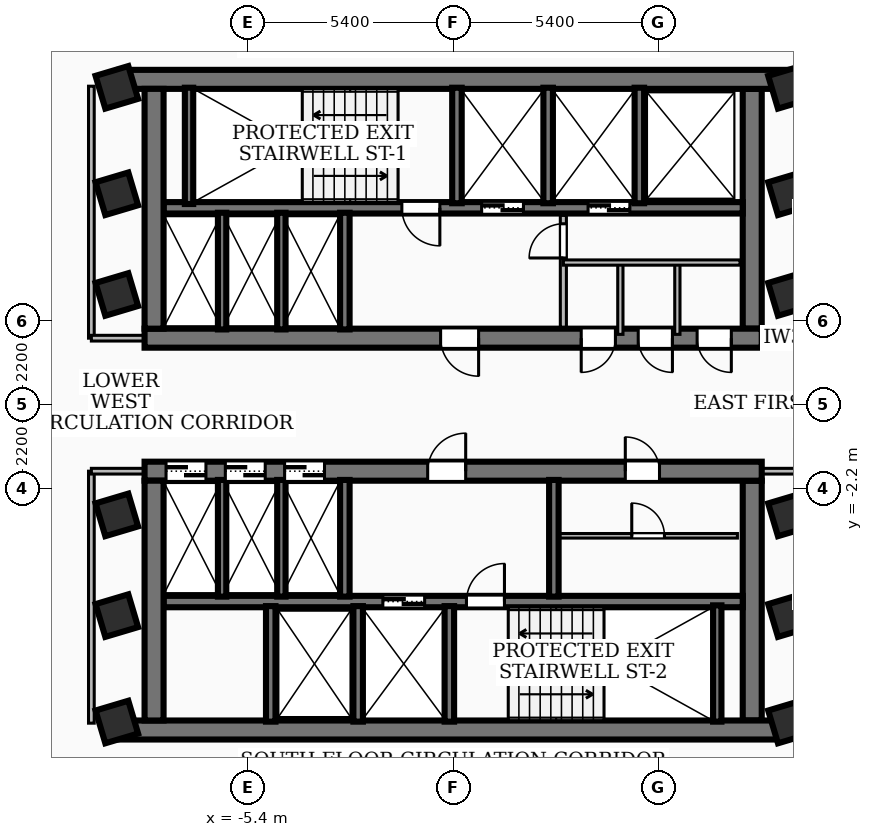
"""IFC4 building model, lengths in metres.
Left out: names, types, materials, properties, quantities, classifications, styles, units other than length and angle.
Written with IfcOpenShell. Run it as: python <this file> out.ifc"""

import sys

from ifc_helpers import new_model, si_unit, direction, frame, frame_2d, origin, origin_2d, place, context, subcontext, project, spatial, rectangle, extrude, element, fill, save


model = new_model("IFC4")
c1 = context("Model", 3, precision=1e-05, world=origin(), true_north=direction((0.0, 1.0)))
c2 = subcontext(c1, "Body", "Model", "MODEL_VIEW")
j1 = project(units=[si_unit("LENGTHUNIT", "METRE"), si_unit("PLANEANGLEUNIT", "RADIAN")], contexts=[c1])
p1 = place(None, origin())
s1 = spatial("IfcSite", under=j1, at=p1, CompositionType="ELEMENT")
p2 = place(p1, origin())
s2 = spatial("IfcBuilding", under=s1, at=p2, CompositionType="ELEMENT")
p3 = place(p2, frame((0.0, 0.0, 145.08)))
s3 = spatial("IfcBuildingStorey", under=s2, at=p3, CompositionType="ELEMENT", Elevation=145.08)
p4 = place(p3, frame((-8.78, 8.56, 0.0), z_axis=(0.0, 0.0, 1.0), x_axis=(1.0, 0.0, 0.0)))
e1 = element("IfcWall", 1, at=p4, inside=s3, PredefinedType="SHEAR", context=c2, shape_type="SweptSolid", body=[
    extrude(rectangle(XDim=17.56, YDim=0.5, at=frame_2d((8.78, 0.0))), origin(), (0.0, 0.0, 1.0), 3.32),
])
p5 = place(p3, frame((8.12, 1.75, 0.0), z_axis=(0.0, 0.0, 1.0), x_axis=(-1.0, 0.0, 0.0)))
e2 = element("IfcWall", 2, at=p5, inside=s3, PredefinedType="SHEAR", context=c2, shape_type="SweptSolid", body=[
    extrude(rectangle(XDim=16.24, YDim=0.5, at=frame_2d((8.12, 0.0))), origin(), (0.0, 0.0, 1.0), 3.32),
])
p6 = place(p5, frame((7.45, 0.0, 0.0)))
e3 = element("IfcOpeningElement", 3, at=p6, cuts=e2, PredefinedType="OPENING", context=c2, shape_type="SweptSolid", body=[
    extrude(rectangle(XDim=1.0, YDim=2.1, at=frame_2d((0.5, 1.05))), frame((0.0, 0.26, 0.0), z_axis=(0.0, -1.0, 0.0), x_axis=(1.0, 0.0, 0.0)), (0.0, 0.0, 1.0), 0.52),
])
p7 = place(p5, frame((3.85, 0.0, 0.0)))
e4 = element("IfcOpeningElement", 4, at=p7, cuts=e2, PredefinedType="OPENING", context=c2, shape_type="SweptSolid", body=[
    extrude(rectangle(XDim=0.9, YDim=2.06, at=frame_2d((0.45, 1.03))), frame((0.0, 0.26, 0.0), z_axis=(0.0, -1.0, 0.0), x_axis=(1.0, 0.0, 0.0)), (0.0, 0.0, 1.0), 0.52),
])
p8 = place(p5, frame((2.35, 0.0, 0.0)))
e5 = element("IfcOpeningElement", 5, at=p8, cuts=e2, PredefinedType="OPENING", context=c2, shape_type="SweptSolid", body=[
    extrude(rectangle(XDim=0.9, YDim=2.06, at=frame_2d((0.45, 1.03))), frame((0.0, 0.26, 0.0), z_axis=(0.0, -1.0, 0.0), x_axis=(1.0, 0.0, 0.0)), (0.0, 0.0, 1.0), 0.52),
])
p9 = place(p5, frame((0.8, 0.0, 0.0)))
e6 = element("IfcOpeningElement", 6, at=p9, cuts=e2, PredefinedType="OPENING", context=c2, shape_type="SweptSolid", body=[
    extrude(rectangle(XDim=0.9, YDim=2.06, at=frame_2d((0.45, 1.03))), frame((0.0, 0.26, 0.0), z_axis=(0.0, -1.0, 0.0), x_axis=(1.0, 0.0, 0.0)), (0.0, 0.0, 1.0), 0.52),
])
for number, where, z_axis, x_axis in (
    (7, (-7.87, 2.0, 0.0), (0.0, 0.0, 1.0), (0.0, 1.0, 0.0)),
    (8, (7.87, 8.31, 0.0), (0.0, 0.0, 1.0), (0.0, -1.0, 0.0)),
):
    element("IfcWall", number, at=place(p3, frame(where, z_axis=z_axis, x_axis=x_axis)), inside=s3, PredefinedType="SHEAR", context=c2, shape_type="SweptSolid", body=[
        extrude(rectangle(XDim=6.31, YDim=0.5, at=frame_2d((3.155, 0.0))), origin(), (0.0, 0.0, 1.0), 3.32),
    ])
p10 = place(p3, frame((7.62, 5.18, 0.0), z_axis=(0.0, 0.0, 1.0), x_axis=(-1.0, 0.0, 0.0)))
e9 = element("IfcWall", 9, at=p10, inside=s3, PredefinedType="SOLIDWALL", context=c2, shape_type="SweptSolid", body=[
    extrude(rectangle(XDim=15.24, YDim=0.3, at=frame_2d((7.62, 0.0))), origin(), (0.0, 0.0, 1.0), 3.32),
])
p11 = place(p10, frame((5.77, 0.0, 0.0)))
e10 = element("IfcOpeningElement", 10, at=p11, cuts=e9, PredefinedType="OPENING", context=c2, shape_type="SweptSolid", body=[
    extrude(rectangle(XDim=1.1, YDim=2.15, at=frame_2d((0.55, 1.075))), frame((0.0, 0.16, 0.0), z_axis=(0.0, -1.0, 0.0), x_axis=(1.0, 0.0, 0.0)), (0.0, 0.0, 1.0), 0.32),
])
p12 = place(p10, frame((2.97, 0.0, 0.0)))
e11 = element("IfcOpeningElement", 11, at=p12, cuts=e9, PredefinedType="OPENING", context=c2, shape_type="SweptSolid", body=[
    extrude(rectangle(XDim=1.1, YDim=2.15, at=frame_2d((0.55, 1.075))), frame((0.0, 0.16, 0.0), z_axis=(0.0, -1.0, 0.0), x_axis=(1.0, 0.0, 0.0)), (0.0, 0.0, 1.0), 0.32),
])
p13 = place(p10, frame((7.97, 0.0, 0.0)))
e12 = element("IfcOpeningElement", 12, at=p13, cuts=e9, PredefinedType="OPENING", context=c2, shape_type="SweptSolid", body=[
    extrude(rectangle(XDim=1.0, YDim=2.1, at=frame_2d((0.5, 1.05))), frame((0.0, 0.16, 0.0), z_axis=(0.0, -1.0, 0.0), x_axis=(1.0, 0.0, 0.0)), (0.0, 0.0, 1.0), 0.32),
])
p14 = place(p3, frame((8.78, -8.56, 0.0), z_axis=(0.0, 0.0, 1.0), x_axis=(-1.0, 0.0, 0.0)))
e13 = element("IfcWall", 13, at=p14, inside=s3, PredefinedType="SHEAR", context=c2, shape_type="SweptSolid", body=[
    extrude(rectangle(XDim=17.56, YDim=0.5, at=frame_2d((8.78, 0.0))), origin(), (0.0, 0.0, 1.0), 3.32),
])
p15 = place(p3, frame((-8.12, -1.75, 0.0), z_axis=(0.0, 0.0, 1.0), x_axis=(1.0, 0.0, 0.0)))
e14 = element("IfcWall", 14, at=p15, inside=s3, PredefinedType="SHEAR", context=c2, shape_type="SweptSolid", body=[
    extrude(rectangle(XDim=16.24, YDim=0.5, at=frame_2d((8.12, 0.0))), origin(), (0.0, 0.0, 1.0), 3.32),
])
p16 = place(p15, frame((7.45, 0.0, 0.0)))
e15 = element("IfcOpeningElement", 15, at=p16, cuts=e14, PredefinedType="OPENING", context=c2, shape_type="SweptSolid", body=[
    extrude(rectangle(XDim=1.0, YDim=2.1, at=frame_2d((0.5, 1.05))), frame((0.0, 0.26, 0.0), z_axis=(0.0, -1.0, 0.0), x_axis=(1.0, 0.0, 0.0)), (0.0, 0.0, 1.0), 0.52),
])
p17 = place(p15, frame((12.65, 0.0, 0.0)))
e16 = element("IfcOpeningElement", 16, at=p17, cuts=e14, PredefinedType="OPENING", context=c2, shape_type="SweptSolid", body=[
    extrude(rectangle(XDim=0.9, YDim=2.06, at=frame_2d((0.45, 1.03))), frame((0.0, 0.26, 0.0), z_axis=(0.0, -1.0, 0.0), x_axis=(1.0, 0.0, 0.0)), (0.0, 0.0, 1.0), 0.52),
])
p18 = place(p15, frame((0.565, 0.0, 0.0)))
e17 = element("IfcOpeningElement", 17, at=p18, cuts=e14, PredefinedType="OPENING", context=c2, shape_type="SweptSolid", body=[
    extrude(rectangle(XDim=1.05, YDim=2.15, at=frame_2d((0.525, 1.075))), frame((0.0, 0.26, 0.0), z_axis=(0.0, -1.0, 0.0), x_axis=(1.0, 0.0, 0.0)), (0.0, 0.0, 1.0), 0.52),
])
p19 = place(p15, frame((2.125, 0.0, 0.0)))
e18 = element("IfcOpeningElement", 18, at=p19, cuts=e14, PredefinedType="OPENING", context=c2, shape_type="SweptSolid", body=[
    extrude(rectangle(XDim=1.05, YDim=2.15, at=frame_2d((0.525, 1.075))), frame((0.0, 0.26, 0.0), z_axis=(0.0, -1.0, 0.0), x_axis=(1.0, 0.0, 0.0)), (0.0, 0.0, 1.0), 0.52),
])
p20 = place(p15, frame((3.685, 0.0, 0.0)))
e19 = element("IfcOpeningElement", 19, at=p20, cuts=e14, PredefinedType="OPENING", context=c2, shape_type="SweptSolid", body=[
    extrude(rectangle(XDim=1.05, YDim=2.15, at=frame_2d((0.525, 1.075))), frame((0.0, 0.26, 0.0), z_axis=(0.0, -1.0, 0.0), x_axis=(1.0, 0.0, 0.0)), (0.0, 0.0, 1.0), 0.52),
])
for number, where, z_axis, x_axis in (
    (20, (-7.87, -8.31, 0.0), (0.0, 0.0, 1.0), (0.0, 1.0, 0.0)),
    (21, (7.87, -2.0, 0.0), (0.0, 0.0, 1.0), (0.0, -1.0, 0.0)),
):
    element("IfcWall", number, at=place(p3, frame(where, z_axis=z_axis, x_axis=x_axis)), inside=s3, PredefinedType="SHEAR", context=c2, shape_type="SweptSolid", body=[
        extrude(rectangle(XDim=6.31, YDim=0.5, at=frame_2d((3.155, 0.0))), origin(), (0.0, 0.0, 1.0), 3.32),
    ])
p21 = place(p3, frame((-7.62, -5.18, 0.0), z_axis=(0.0, 0.0, 1.0), x_axis=(1.0, 0.0, 0.0)))
e22 = element("IfcWall", 22, at=p21, inside=s3, PredefinedType="SOLIDWALL", context=c2, shape_type="SweptSolid", body=[
    extrude(rectangle(XDim=15.24, YDim=0.3, at=frame_2d((7.62, 0.0))), origin(), (0.0, 0.0, 1.0), 3.32),
])
p22 = place(p21, frame((5.77, 0.0, 0.0)))
e23 = element("IfcOpeningElement", 23, at=p22, cuts=e22, PredefinedType="OPENING", context=c2, shape_type="SweptSolid", body=[
    extrude(rectangle(XDim=1.1, YDim=2.15, at=frame_2d((0.55, 1.075))), frame((0.0, 0.16, 0.0), z_axis=(0.0, -1.0, 0.0), x_axis=(1.0, 0.0, 0.0)), (0.0, 0.0, 1.0), 0.32),
])
p23 = place(p21, frame((7.97, 0.0, 0.0)))
e24 = element("IfcOpeningElement", 24, at=p23, cuts=e22, PredefinedType="OPENING", context=c2, shape_type="SweptSolid", body=[
    extrude(rectangle(XDim=1.0, YDim=2.1, at=frame_2d((0.5, 1.05))), frame((0.0, 0.16, 0.0), z_axis=(0.0, -1.0, 0.0), x_axis=(1.0, 0.0, 0.0)), (0.0, 0.0, 1.0), 0.32),
])
for number, where, z_axis, x_axis in (
    (25, (-6.95, 5.28, 0.0), (0.0, 0.0, 1.0), (0.0, 1.0, 0.0)),
    (26, (6.95, -8.34, 0.0), (0.0, 0.0, 1.0), (0.0, 1.0, 0.0)),
):
    element("IfcWall", number, at=place(p3, frame(where, z_axis=z_axis, x_axis=x_axis)), inside=s3, PredefinedType="SOLIDWALL", context=c2, shape_type="SweptSolid", body=[
        extrude(rectangle(XDim=3.06, YDim=0.22, at=frame_2d((1.53, 0.0))), origin(), (0.0, 0.0, 1.0), 3.32),
    ])
for number, where, z_axis, x_axis in (
    (27, (0.1, 5.3, 0.0), (0.0, 0.0, 1.0), (0.0, 1.0, 0.0)),
    (28, (2.5, 5.3, 0.0), (0.0, 0.0, 1.0), (0.0, 1.0, 0.0)),
    (29, (4.9, 5.3, 0.0), (0.0, 0.0, 1.0), (0.0, 1.0, 0.0)),
):
    element("IfcWall", number, at=place(p3, frame(where, z_axis=z_axis, x_axis=x_axis)), inside=s3, PredefinedType="SOLIDWALL", context=c2, shape_type="SweptSolid", body=[
        extrude(rectangle(XDim=3.04, YDim=0.25, at=frame_2d((1.52, 0.0))), origin(), (0.0, 0.0, 1.0), 3.32),
    ])
p24 = place(p3, frame((-2.85, 1.98, 0.0), z_axis=(0.0, 0.0, 1.0), x_axis=(0.0, 1.0, 0.0)))
e30 = element("IfcWall", 30, at=p24, inside=s3, PredefinedType="SOLIDWALL", context=c2, shape_type="SweptSolid", body=[
    extrude(rectangle(XDim=3.07, YDim=0.25, at=frame_2d((1.535, 0.0))), origin(), (0.0, 0.0, 1.0), 3.32),
])
for number, where, z_axis, x_axis in (
    (31, (-0.1, -8.34, 0.0), (0.0, 0.0, 1.0), (0.0, 1.0, 0.0)),
    (32, (-2.5, -8.34, 0.0), (0.0, 0.0, 1.0), (0.0, 1.0, 0.0)),
    (33, (-4.8, -8.34, 0.0), (0.0, 0.0, 1.0), (0.0, 1.0, 0.0)),
):
    element("IfcWall", number, at=place(p3, frame(where, z_axis=z_axis, x_axis=x_axis)), inside=s3, PredefinedType="SOLIDWALL", context=c2, shape_type="SweptSolid", body=[
        extrude(rectangle(XDim=3.04, YDim=0.25, at=frame_2d((1.52, 0.0))), origin(), (0.0, 0.0, 1.0), 3.32),
    ])
for number, where, z_axis, x_axis in (
    (34, (-2.85, -5.05, 0.0), (0.0, 0.0, 1.0), (0.0, 1.0, 0.0)),
    (35, (2.65, -5.05, 0.0), (0.0, 0.0, 1.0), (0.0, 1.0, 0.0)),
):
    element("IfcWall", number, at=place(p3, frame(where, z_axis=z_axis, x_axis=x_axis)), inside=s3, PredefinedType="SOLIDWALL", context=c2, shape_type="SweptSolid", body=[
        extrude(rectangle(XDim=3.07, YDim=0.25, at=frame_2d((1.535, 0.0))), origin(), (0.0, 0.0, 1.0), 3.32),
    ])
for number, where, z_axis, x_axis in (
    (36, (-6.08, 1.98, 0.0), (0.0, 0.0, 1.0), (0.0, 1.0, 0.0)),
    (37, (-4.52, 1.98, 0.0), (0.0, 0.0, 1.0), (0.0, 1.0, 0.0)),
    (38, (-6.08, -5.05, 0.0), (0.0, 0.0, 1.0), (0.0, 1.0, 0.0)),
    (39, (-4.52, -5.05, 0.0), (0.0, 0.0, 1.0), (0.0, 1.0, 0.0)),
):
    element("IfcWall", number, at=place(p3, frame(where, z_axis=z_axis, x_axis=x_axis)), inside=s3, PredefinedType="SOLIDWALL", context=c2, shape_type="SweptSolid", body=[
        extrude(rectangle(XDim=3.07, YDim=0.22, at=frame_2d((1.535, 0.0))), origin(), (0.0, 0.0, 1.0), 3.32),
    ])
for number, where, z_axis, x_axis in (
    (40, (-8.85, -5.55, 0.0), (0.0, 0.0, 1.0), (0.958, 0.286, 0.0)),
    (41, (-8.85, -2.9, 0.0), (0.0, 0.0, 1.0), (0.958, 0.286, 0.0)),
    (42, (-8.85, 2.9, 0.0), (0.0, 0.0, 1.0), (0.958, 0.286, 0.0)),
    (43, (-8.85, 5.55, 0.0), (0.0, 0.0, 1.0), (0.958, 0.286, 0.0)),
    (44, (8.85, -5.55, 0.0), (0.0, 0.0, 1.0), (0.958, 0.286, 0.0)),
    (45, (8.85, -2.9, 0.0), (0.0, 0.0, 1.0), (0.958, 0.286, 0.0)),
    (46, (8.85, 2.9, 0.0), (0.0, 0.0, 1.0), (0.958, 0.286, 0.0)),
    (47, (8.85, 5.55, 0.0), (0.0, 0.0, 1.0), (0.958, 0.286, 0.0)),
    (48, (-8.85, 8.35, 0.0), (0.0, 0.0, 1.0), (0.958, 0.286, 0.0)),
    (49, (8.85, -8.35, 0.0), (0.0, 0.0, 1.0), (0.958, 0.286, 0.0)),
    (50, (8.85, 8.35, 0.0), (0.0, 0.0, 1.0), (0.958, 0.286, 0.0)),
    (51, (-8.85, -8.35, 0.0), (0.0, 0.0, 1.0), (0.958, 0.286, 0.0)),
):
    element("IfcColumn", number, at=place(p3, frame(where, z_axis=z_axis, x_axis=x_axis)), inside=s3, PredefinedType="COLUMN", context=c2, shape_type="SweptSolid", body=[
        extrude(rectangle(XDim=0.9, YDim=0.9, at=origin_2d()), origin(), (0.0, 0.0, 1.0), 3.6),
    ])
p25 = place(p3, frame((2.9, 2.04, 0.0), z_axis=(0.0, 0.0, 1.0), x_axis=(0.0, 1.0, 0.0)))
e52 = element("IfcWall", 52, at=p25, inside=s3, PredefinedType="PARTITIONING", context=c2, shape_type="SweptSolid", body=[
    extrude(rectangle(XDim=2.94, YDim=0.16, at=frame_2d((1.47, 0.0))), origin(), (0.0, 0.0, 1.0), 2.55),
])
p26 = place(p25, frame((1.82, 0.0, 0.0)))
e53 = element("IfcOpeningElement", 53, at=p26, cuts=e52, PredefinedType="OPENING", context=c2, shape_type="SweptSolid", body=[
    extrude(rectangle(XDim=0.9, YDim=2.06, at=frame_2d((0.45, 1.03))), frame((0.0, 0.09, 0.0), z_axis=(0.0, -1.0, 0.0), x_axis=(1.0, 0.0, 0.0)), (0.0, 0.0, 1.0), 0.18),
])
p27 = place(p3, frame((2.9, 3.74, 0.0), z_axis=(0.0, 0.0, 1.0), x_axis=(1.0, 0.0, 0.0)))
e54 = element("IfcWall", 54, at=p27, inside=s3, PredefinedType="PARTITIONING", context=c2, shape_type="SweptSolid", body=[
    extrude(rectangle(XDim=4.65, YDim=0.138, at=frame_2d((2.325, 0.0))), origin(), (0.0, 0.0, 1.0), 3.32),
])
p28 = place(p3, frame((2.8, -3.45, 0.0), z_axis=(0.0, 0.0, 1.0), x_axis=(1.0, 0.0, 0.0)))
e55 = element("IfcWall", 55, at=p28, inside=s3, PredefinedType="PARTITIONING", context=c2, shape_type="SweptSolid", body=[
    extrude(rectangle(XDim=4.68, YDim=0.12, at=frame_2d((2.34, 0.0))), origin(), (0.0, 0.0, 1.0), 3.32),
])
p29 = place(p28, frame((1.9, 0.0, 0.0)))
e56 = element("IfcOpeningElement", 56, at=p29, cuts=e55, PredefinedType="OPENING", context=c2, shape_type="SweptSolid", body=[
    extrude(rectangle(XDim=0.86, YDim=2.04, at=frame_2d((0.43, 1.02))), frame((0.0, 0.07, 0.0), z_axis=(0.0, -1.0, 0.0), x_axis=(1.0, 0.0, 0.0)), (0.0, 0.0, 1.0), 0.14),
])
for number, where, z_axis, x_axis in (
    (57, (4.4, 1.85, 0.0), (0.0, 0.0, 1.0), (0.0, 1.0, 0.0)),
    (58, (5.9, 1.85, 0.0), (0.0, 0.0, 1.0), (0.0, 1.0, 0.0)),
):
    element("IfcWall", number, at=place(p3, frame(where, z_axis=z_axis, x_axis=x_axis)), inside=s3, PredefinedType="PARTITIONING", context=c2, shape_type="SweptSolid", body=[
        extrude(rectangle(XDim=1.89, YDim=0.138, at=frame_2d((0.945, 0.0))), origin(), (0.0, 0.0, 1.0), 2.55),
    ])
p30 = place(p3, frame((-9.52, 1.75, 0.0), z_axis=(0.0, 0.0, 1.0), x_axis=(0.0, 1.0, 0.0)))
e59 = element("IfcWall", 59, at=p30, inside=s3, PredefinedType="PARTITIONING", context=c2, shape_type="SweptSolid", body=[
    extrude(rectangle(XDim=6.63, YDim=0.15, at=frame_2d((3.315, 0.0))), origin(), (0.0, 0.0, 1.0), 2.55),
])
p31 = place(p3, frame((-7.85, 1.75, 0.0), z_axis=(0.0, 0.0, 1.0), x_axis=(-1.0, 0.0, 0.0)))
e60 = element("IfcWall", 60, at=p31, inside=s3, PredefinedType="PARTITIONING", context=c2, shape_type="SweptSolid", body=[
    extrude(rectangle(XDim=1.67, YDim=0.15, at=frame_2d((0.835, 0.0))), origin(), (0.0, 0.0, 1.0), 2.55),
])
p32 = place(p3, frame((-9.52, -8.38, 0.0), z_axis=(0.0, 0.0, 1.0), x_axis=(0.0, 1.0, 0.0)))
e61 = element("IfcWall", 61, at=p32, inside=s3, PredefinedType="PARTITIONING", context=c2, shape_type="SweptSolid", body=[
    extrude(rectangle(XDim=6.63, YDim=0.15, at=frame_2d((3.315, 0.0))), origin(), (0.0, 0.0, 1.0), 2.55),
])
for number, where, z_axis, x_axis in (
    (62, (-7.85, -1.75, 0.0), (0.0, 0.0, 1.0), (-1.0, 0.0, 0.0)),
    (63, (7.85, 1.75, 0.0), (0.0, 0.0, 1.0), (1.0, 0.0, 0.0)),
    (64, (7.85, -1.75, 0.0), (0.0, 0.0, 1.0), (1.0, 0.0, 0.0)),
):
    element("IfcWall", number, at=place(p3, frame(where, z_axis=z_axis, x_axis=x_axis)), inside=s3, PredefinedType="PARTITIONING", context=c2, shape_type="SweptSolid", body=[
        extrude(rectangle(XDim=1.67, YDim=0.15, at=frame_2d((0.835, 0.0))), origin(), (0.0, 0.0, 1.0), 2.55),
    ])
p33 = place(p6, origin())
e65 = element("IfcDoor", 65, at=p33, inside=s3, OperationType="SINGLE_SWING_LEFT", PredefinedType="DOOR", context=c2, shape_type="SweptSolid", body=[
    extrude(rectangle(XDim=1.0, YDim=2.1, at=frame_2d((0.5, 1.05))), frame((0.0, 0.025, 0.0), z_axis=(0.0, -1.0, 0.0), x_axis=(1.0, 0.0, 0.0)), (0.0, 0.0, 1.0), 0.05),
])
fill(e3, e65)
p34 = place(p16, origin())
e66 = element("IfcDoor", 66, at=p34, inside=s3, OperationType="SINGLE_SWING_RIGHT", PredefinedType="DOOR", context=c2, shape_type="SweptSolid", body=[
    extrude(rectangle(XDim=1.0, YDim=2.1, at=frame_2d((0.5, 1.05))), frame((0.0, 0.025, 0.0), z_axis=(0.0, -1.0, 0.0), x_axis=(1.0, 0.0, 0.0)), (0.0, 0.0, 1.0), 0.05),
])
fill(e15, e66)
p35 = place(p11, origin())
e67 = element("IfcDoor", 67, at=p35, inside=s3, OperationType="DOUBLE_DOOR_SLIDING", PredefinedType="DOOR", context=c2, shape_type="SweptSolid", body=[
    extrude(rectangle(XDim=1.1, YDim=2.15, at=frame_2d((0.55, 1.075))), frame((0.0, 0.025, 0.0), z_axis=(0.0, -1.0, 0.0), x_axis=(1.0, 0.0, 0.0)), (0.0, 0.0, 1.0), 0.05),
])
fill(e10, e67)
p36 = place(p12, origin())
e68 = element("IfcDoor", 68, at=p36, inside=s3, OperationType="DOUBLE_DOOR_SLIDING", PredefinedType="DOOR", context=c2, shape_type="SweptSolid", body=[
    extrude(rectangle(XDim=1.1, YDim=2.15, at=frame_2d((0.55, 1.075))), frame((0.0, 0.025, 0.0), z_axis=(0.0, -1.0, 0.0), x_axis=(1.0, 0.0, 0.0)), (0.0, 0.0, 1.0), 0.05),
])
fill(e11, e68)
p37 = place(p13, origin())
e69 = element("IfcDoor", 69, at=p37, inside=s3, OperationType="SINGLE_SWING_LEFT", PredefinedType="DOOR", context=c2, shape_type="SweptSolid", body=[
    extrude(rectangle(XDim=1.0, YDim=2.1, at=frame_2d((0.5, 1.05))), frame((0.0, 0.025, 0.0), z_axis=(0.0, -1.0, 0.0), x_axis=(1.0, 0.0, 0.0)), (0.0, 0.0, 1.0), 0.05),
])
fill(e12, e69)
p38 = place(p22, origin())
e70 = element("IfcDoor", 70, at=p38, inside=s3, OperationType="DOUBLE_DOOR_SLIDING", PredefinedType="DOOR", context=c2, shape_type="SweptSolid", body=[
    extrude(rectangle(XDim=1.1, YDim=2.15, at=frame_2d((0.55, 1.075))), frame((0.0, 0.025, 0.0), z_axis=(0.0, -1.0, 0.0), x_axis=(1.0, 0.0, 0.0)), (0.0, 0.0, 1.0), 0.05),
])
fill(e23, e70)
p39 = place(p23, origin())
e71 = element("IfcDoor", 71, at=p39, inside=s3, OperationType="SINGLE_SWING_RIGHT", PredefinedType="DOOR", context=c2, shape_type="SweptSolid", body=[
    extrude(rectangle(XDim=1.0, YDim=2.1, at=frame_2d((0.5, 1.05))), frame((0.0, 0.025, 0.0), z_axis=(0.0, -1.0, 0.0), x_axis=(1.0, 0.0, 0.0)), (0.0, 0.0, 1.0), 0.05),
])
fill(e24, e71)
p40 = place(p17, origin())
e72 = element("IfcDoor", 72, at=p40, inside=s3, OperationType="SINGLE_SWING_LEFT", PredefinedType="DOOR", context=c2, shape_type="SweptSolid", body=[
    extrude(rectangle(XDim=0.9, YDim=2.06, at=frame_2d((0.45, 1.03))), frame((0.0, 0.025, 0.0), z_axis=(0.0, -1.0, 0.0), x_axis=(1.0, 0.0, 0.0)), (0.0, 0.0, 1.0), 0.05),
])
fill(e16, e72)
p41 = place(p18, origin())
e73 = element("IfcDoor", 73, at=p41, inside=s3, OperationType="DOUBLE_DOOR_SLIDING", PredefinedType="DOOR", context=c2, shape_type="SweptSolid", body=[
    extrude(rectangle(XDim=1.05, YDim=2.15, at=frame_2d((0.525, 1.075))), frame((0.0, 0.025, 0.0), z_axis=(0.0, -1.0, 0.0), x_axis=(1.0, 0.0, 0.0)), (0.0, 0.0, 1.0), 0.05),
])
fill(e17, e73)
p42 = place(p19, origin())
e74 = element("IfcDoor", 74, at=p42, inside=s3, OperationType="DOUBLE_DOOR_SLIDING", PredefinedType="DOOR", context=c2, shape_type="SweptSolid", body=[
    extrude(rectangle(XDim=1.05, YDim=2.15, at=frame_2d((0.525, 1.075))), frame((0.0, 0.025, 0.0), z_axis=(0.0, -1.0, 0.0), x_axis=(1.0, 0.0, 0.0)), (0.0, 0.0, 1.0), 0.05),
])
fill(e18, e74)
p43 = place(p20, origin())
e75 = element("IfcDoor", 75, at=p43, inside=s3, OperationType="DOUBLE_DOOR_SLIDING", PredefinedType="DOOR", context=c2, shape_type="SweptSolid", body=[
    extrude(rectangle(XDim=1.05, YDim=2.15, at=frame_2d((0.525, 1.075))), frame((0.0, 0.025, 0.0), z_axis=(0.0, -1.0, 0.0), x_axis=(1.0, 0.0, 0.0)), (0.0, 0.0, 1.0), 0.05),
])
fill(e19, e75)
p44 = place(p7, origin())
e76 = element("IfcDoor", 76, at=p44, inside=s3, OperationType="SINGLE_SWING_RIGHT", PredefinedType="DOOR", context=c2, shape_type="SweptSolid", body=[
    extrude(rectangle(XDim=0.9, YDim=2.06, at=frame_2d((0.45, 1.03))), frame((0.0, 0.025, 0.0), z_axis=(0.0, -1.0, 0.0), x_axis=(1.0, 0.0, 0.0)), (0.0, 0.0, 1.0), 0.05),
])
fill(e4, e76)
p45 = place(p8, origin())
e77 = element("IfcDoor", 77, at=p45, inside=s3, OperationType="SINGLE_SWING_LEFT", PredefinedType="DOOR", context=c2, shape_type="SweptSolid", body=[
    extrude(rectangle(XDim=0.9, YDim=2.06, at=frame_2d((0.45, 1.03))), frame((0.0, 0.025, 0.0), z_axis=(0.0, -1.0, 0.0), x_axis=(1.0, 0.0, 0.0)), (0.0, 0.0, 1.0), 0.05),
])
fill(e5, e77)
p46 = place(p9, origin())
e78 = element("IfcDoor", 78, at=p46, inside=s3, OperationType="SINGLE_SWING_LEFT", PredefinedType="DOOR", context=c2, shape_type="SweptSolid", body=[
    extrude(rectangle(XDim=0.9, YDim=2.06, at=frame_2d((0.45, 1.03))), frame((0.0, 0.025, 0.0), z_axis=(0.0, -1.0, 0.0), x_axis=(1.0, 0.0, 0.0)), (0.0, 0.0, 1.0), 0.05),
])
fill(e6, e78)
p47 = place(p26, origin())
e79 = element("IfcDoor", 79, at=p47, inside=s3, OperationType="SINGLE_SWING_LEFT", PredefinedType="DOOR", context=c2, shape_type="SweptSolid", body=[
    extrude(rectangle(XDim=0.9, YDim=2.06, at=frame_2d((0.45, 1.03))), frame((0.0, 0.025, 0.0), z_axis=(0.0, -1.0, 0.0), x_axis=(1.0, 0.0, 0.0)), (0.0, 0.0, 1.0), 0.05),
])
fill(e53, e79)
p48 = place(p29, origin())
e80 = element("IfcDoor", 80, at=p48, inside=s3, OperationType="SINGLE_SWING_LEFT", PredefinedType="DOOR", context=c2, shape_type="SweptSolid", body=[
    extrude(rectangle(XDim=0.86, YDim=2.04, at=frame_2d((0.43, 1.02))), frame((0.0, 0.025, 0.0), z_axis=(0.0, -1.0, 0.0), x_axis=(1.0, 0.0, 0.0)), (0.0, 0.0, 1.0), 0.05),
])
fill(e56, e80)
save(model, sys.argv[1])
